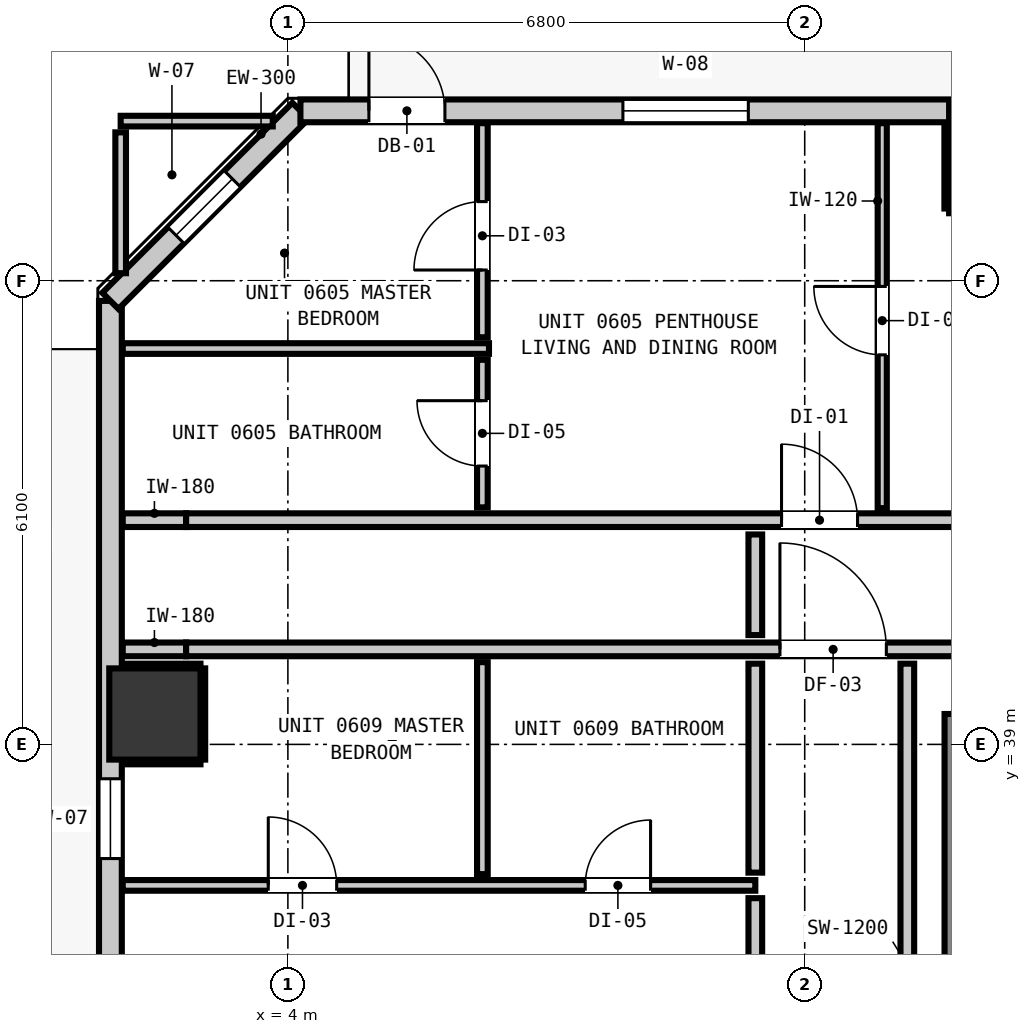
"""IFC4 building model, lengths in metres.
Left out: names, types, materials, properties, quantities, classifications, styles, units other than length and angle.
Written with IfcOpenShell. Run it as: python <this file> out.ifc"""

import sys

from ifc_helpers import new_model, si_unit, direction, frame, frame_2d, origin, origin_2d, place, context, subcontext, project, spatial, rectangle, extrude, element, fill, save


model = new_model("IFC4")
c1 = context("Model", 3, precision=1e-05, world=origin(), true_north=direction((0.0, 1.0)))
c2 = subcontext(c1, "Body", "Model", "MODEL_VIEW")
j1 = project(units=[si_unit("LENGTHUNIT", "METRE"), si_unit("PLANEANGLEUNIT", "RADIAN")], contexts=[c1])
p1 = place(None, origin())
s1 = spatial("IfcSite", under=j1, at=p1, CompositionType="ELEMENT")
p2 = place(p1, origin())
s2 = spatial("IfcBuilding", under=s1, at=p2, CompositionType="ELEMENT")
p3 = place(p2, frame((0.0, 0.0, 25.32)))
s3 = spatial("IfcBuildingStorey", under=s2, at=p3, CompositionType="ELEMENT", Elevation=25.32)
p4 = place(p3, frame((13.24, 31.205, 0.0), z_axis=(0.0, 0.0, 1.0), x_axis=(0.0, 1.0, 0.0)))
e1 = element("IfcWall", 1, at=p4, inside=s3, PredefinedType="SHEAR", context=c2, shape_type="SweptSolid", body=[
    extrude(rectangle(XDim=8.195, YDim=1.2, at=frame_2d((4.097, 0.0))), origin(), (0.0, 0.0, 1.0), 3.32),
])
p5 = place(p3, frame((13.4, 46.75, 0.0), z_axis=(0.0, 0.0, 1.0), x_axis=(1.0, 0.0, 0.0)))
e2 = element("IfcColumn", 2, at=p5, inside=s3, PredefinedType="COLUMN", context=c2, shape_type="SweptSolid", body=[
    extrude(rectangle(XDim=1.4, YDim=1.4, at=origin_2d()), origin(), (0.0, 0.0, 1.0), 3.32),
])
p6 = place(p3, frame((2.25, 39.4, 0.0), z_axis=(0.0, 0.0, 1.0), x_axis=(1.0, 0.0, 0.0)))
e3 = element("IfcColumn", 3, at=p6, inside=s3, PredefinedType="COLUMN", context=c2, shape_type="SweptSolid", body=[
    extrude(rectangle(XDim=1.2, YDim=1.2, at=origin_2d()), origin(), (0.0, 0.0, 1.0), 3.32),
])
p7 = place(p3, frame((1.665, 10.165, 0.0), z_axis=(0.0, 0.0, 1.0), x_axis=(0.0, 1.0, 0.0)))
e4 = element("IfcWall", 4, at=p7, inside=s3, PredefinedType="STANDARD", context=c2, shape_type="SweptSolid", body=[
    extrude(rectangle(XDim=34.67, YDim=0.3, at=frame_2d((17.335, 0.0))), origin(), (0.0, 0.0, 1.0), 3.06),
])
p8 = place(p7, frame((3.352, 0.0, 0.0)))
e5 = element("IfcOpeningElement", 5, at=p8, cuts=e4, PredefinedType="OPENING", context=c2, shape_type="SweptSolid", body=[
    extrude(rectangle(XDim=1.0, YDim=2.15, at=frame_2d((0.5, 1.075))), frame((0.0, 0.16, 0.0), z_axis=(0.0, -1.0, 0.0), x_axis=(1.0, 0.0, 0.0)), (0.0, 0.0, 1.0), 0.32),
])
p9 = place(p7, frame((14.448, 0.0, 0.85)))
e6 = element("IfcOpeningElement", 6, at=p9, cuts=e4, PredefinedType="OPENING", context=c2, shape_type="SweptSolid", body=[
    extrude(rectangle(XDim=1.65, YDim=1.75, at=frame_2d((0.825, 0.875))), frame((0.0, 0.16, 0.0), z_axis=(0.0, -1.0, 0.0), x_axis=(1.0, 0.0, 0.0)), (0.0, 0.0, 1.0), 0.32),
])
p10 = place(p7, frame((17.598, 0.0, 0.85)))
e7 = element("IfcOpeningElement", 7, at=p10, cuts=e4, PredefinedType="OPENING", context=c2, shape_type="SweptSolid", body=[
    extrude(rectangle(XDim=1.65, YDim=1.75, at=frame_2d((0.825, 0.875))), frame((0.0, 0.16, 0.0), z_axis=(0.0, -1.0, 0.0), x_axis=(1.0, 0.0, 0.0)), (0.0, 0.0, 1.0), 0.32),
])
p11 = place(p7, frame((23.982, 0.0, 0.85)))
e8 = element("IfcOpeningElement", 8, at=p11, cuts=e4, PredefinedType="OPENING", context=c2, shape_type="SweptSolid", body=[
    extrude(rectangle(XDim=1.65, YDim=1.75, at=frame_2d((0.825, 0.875))), frame((0.0, 0.16, 0.0), z_axis=(0.0, -1.0, 0.0), x_axis=(1.0, 0.0, 0.0)), (0.0, 0.0, 1.0), 0.32),
])
p12 = place(p7, frame((27.333, 0.0, 0.85)))
e9 = element("IfcOpeningElement", 9, at=p12, cuts=e4, PredefinedType="OPENING", context=c2, shape_type="SweptSolid", body=[
    extrude(rectangle(XDim=1.05, YDim=1.65, at=frame_2d((0.525, 0.825))), frame((0.0, 0.16, 0.0), z_axis=(0.0, -1.0, 0.0), x_axis=(1.0, 0.0, 0.0)), (0.0, 0.0, 1.0), 0.32),
])
p13 = place(p3, frame((1.665, 44.835, 0.0), z_axis=(0.0, 0.0, 1.0), x_axis=(0.707106781187, 0.707106781187, 0.0)))
e10 = element("IfcWall", 10, at=p13, inside=s3, PredefinedType="STANDARD", context=c2, shape_type="SweptSolid", body=[
    extrude(rectangle(XDim=3.536, YDim=0.3, at=frame_2d((1.768, 0.0))), origin(), (0.0, 0.0, 1.0), 3.06),
])
p14 = place(p13, frame((1.22, 0.0, 0.85)))
e11 = element("IfcOpeningElement", 11, at=p14, cuts=e10, PredefinedType="OPENING", context=c2, shape_type="SweptSolid", body=[
    extrude(rectangle(XDim=1.05, YDim=1.65, at=frame_2d((0.525, 0.825))), frame((0.0, 0.16, 0.0), z_axis=(0.0, -1.0, 0.0), x_axis=(1.0, 0.0, 0.0)), (0.0, 0.0, 1.0), 0.32),
])
p15 = place(p3, frame((4.165, 47.335, 0.0), z_axis=(0.0, 0.0, 1.0), x_axis=(1.0, 0.0, 0.0)))
e12 = element("IfcWall", 12, at=p15, inside=s3, PredefinedType="STANDARD", context=c2, shape_type="SweptSolid", body=[
    extrude(rectangle(XDim=37.47, YDim=0.3, at=frame_2d((18.735, 0.0))), origin(), (0.0, 0.0, 1.0), 3.06),
])
p16 = place(p15, frame((0.901, 0.0, 0.0)))
e13 = element("IfcOpeningElement", 13, at=p16, cuts=e12, PredefinedType="OPENING", context=c2, shape_type="SweptSolid", body=[
    extrude(rectangle(XDim=1.0, YDim=2.15, at=frame_2d((0.5, 1.075))), frame((0.0, 0.16, 0.0), z_axis=(0.0, -1.0, 0.0), x_axis=(1.0, 0.0, 0.0)), (0.0, 0.0, 1.0), 0.32),
])
p17 = place(p15, frame((4.243, 0.0, 0.85)))
e14 = element("IfcOpeningElement", 14, at=p17, cuts=e12, PredefinedType="OPENING", context=c2, shape_type="SweptSolid", body=[
    extrude(rectangle(XDim=1.65, YDim=1.75, at=frame_2d((0.825, 0.875))), frame((0.0, 0.16, 0.0), z_axis=(0.0, -1.0, 0.0), x_axis=(1.0, 0.0, 0.0)), (0.0, 0.0, 1.0), 0.32),
])
p18 = place(p15, frame((13.079, 0.0, 0.85)))
e15 = element("IfcOpeningElement", 15, at=p18, cuts=e12, PredefinedType="OPENING", context=c2, shape_type="SweptSolid", body=[
    extrude(rectangle(XDim=1.65, YDim=1.75, at=frame_2d((0.825, 0.875))), frame((0.0, 0.16, 0.0), z_axis=(0.0, -1.0, 0.0), x_axis=(1.0, 0.0, 0.0)), (0.0, 0.0, 1.0), 0.32),
])
p19 = place(p15, frame((29.274, 0.0, 0.85)))
e16 = element("IfcOpeningElement", 16, at=p19, cuts=e12, PredefinedType="OPENING", context=c2, shape_type="SweptSolid", body=[
    extrude(rectangle(XDim=1.65, YDim=1.75, at=frame_2d((0.825, 0.875))), frame((0.0, 0.16, 0.0), z_axis=(0.0, -1.0, 0.0), x_axis=(1.0, 0.0, 0.0)), (0.0, 0.0, 1.0), 0.32),
])
p20 = place(p15, frame((26.224, 0.0, 0.85)))
e17 = element("IfcOpeningElement", 17, at=p20, cuts=e12, PredefinedType="OPENING", context=c2, shape_type="SweptSolid", body=[
    extrude(rectangle(XDim=1.65, YDim=1.75, at=frame_2d((0.825, 0.875))), frame((0.0, 0.16, 0.0), z_axis=(0.0, -1.0, 0.0), x_axis=(1.0, 0.0, 0.0)), (0.0, 0.0, 1.0), 0.32),
])
p21 = place(p3, frame((1.827, 40.25, 0.0), z_axis=(0.0, 0.0, 1.0), x_axis=(1.0, 0.0, 0.0)))
e18 = element("IfcWall", 18, at=p21, inside=s3, PredefinedType="PARTITIONING", context=c2, shape_type="SweptSolid", body=[
    extrude(rectangle(XDim=0.834, YDim=0.18, at=frame_2d((0.417, 0.0))), origin(), (0.0, 0.0, 1.0), 3.06),
])
p22 = place(p3, frame((2.661, 40.25, 0.0), z_axis=(0.0, 0.0, 1.0), x_axis=(1.0, 0.0, 0.0)))
e19 = element("IfcWall", 19, at=p22, inside=s3, PredefinedType="PARTITIONING", context=c2, shape_type="SweptSolid", body=[
    extrude(rectangle(XDim=10.328, YDim=0.18, at=frame_2d((5.164, 0.0))), origin(), (0.0, 0.0, 1.0), 2.445),
])
p23 = place(p22, frame((7.813, 0.0, 0.0)))
e20 = element("IfcOpeningElement", 20, at=p23, cuts=e19, PredefinedType="OPENING", context=c2, shape_type="SweptSolid", body=[
    extrude(rectangle(XDim=1.4, YDim=2.15, at=frame_2d((0.7, 1.075))), frame((0.0, 0.1, 0.0), z_axis=(0.0, -1.0, 0.0), x_axis=(1.0, 0.0, 0.0)), (0.0, 0.0, 1.0), 0.2),
])
p24 = place(p3, frame((1.827, 41.95, 0.0), z_axis=(0.0, 0.0, 1.0), x_axis=(1.0, 0.0, 0.0)))
e21 = element("IfcWall", 21, at=p24, inside=s3, PredefinedType="PARTITIONING", context=c2, shape_type="SweptSolid", body=[
    extrude(rectangle(XDim=0.834, YDim=0.18, at=frame_2d((0.417, 0.0))), origin(), (0.0, 0.0, 1.0), 3.06),
])
p25 = place(p3, frame((2.661, 41.95, 0.0), z_axis=(0.0, 0.0, 1.0), x_axis=(1.0, 0.0, 0.0)))
e22 = element("IfcWall", 22, at=p25, inside=s3, PredefinedType="PARTITIONING", context=c2, shape_type="SweptSolid", body=[
    extrude(rectangle(XDim=10.328, YDim=0.18, at=frame_2d((5.164, 0.0))), origin(), (0.0, 0.0, 1.0), 2.445),
])
p26 = place(p25, frame((7.834, 0.0, 0.0)))
e23 = element("IfcOpeningElement", 23, at=p26, cuts=e22, PredefinedType="OPENING", context=c2, shape_type="SweptSolid", body=[
    extrude(rectangle(XDim=1.0, YDim=2.15, at=frame_2d((0.5, 1.075))), frame((0.0, 0.1, 0.0), z_axis=(0.0, -1.0, 0.0), x_axis=(1.0, 0.0, 0.0)), (0.0, 0.0, 1.0), 0.2),
])
p27 = place(p3, frame((1.827, 37.145, 0.0), z_axis=(0.0, 0.0, 1.0), x_axis=(1.0, 0.0, 0.0)))
e24 = element("IfcWall", 24, at=p27, inside=s3, PredefinedType="PARTITIONING", context=c2, shape_type="SweptSolid", body=[
    extrude(rectangle(XDim=8.323, YDim=0.14, at=frame_2d((4.162, 0.0))), origin(), (0.0, 0.0, 1.0), 3.06),
])
p28 = place(p27, frame((6.085, 0.0, 0.0)))
e25 = element("IfcOpeningElement", 25, at=p28, cuts=e24, PredefinedType="OPENING", context=c2, shape_type="SweptSolid", body=[
    extrude(rectangle(XDim=0.86, YDim=2.02, at=frame_2d((0.43, 1.01))), frame((0.0, 0.08, 0.0), z_axis=(0.0, -1.0, 0.0), x_axis=(1.0, 0.0, 0.0)), (0.0, 0.0, 1.0), 0.16),
])
p29 = place(p27, frame((1.915, 0.0, 0.0)))
e26 = element("IfcOpeningElement", 26, at=p29, cuts=e24, PredefinedType="OPENING", context=c2, shape_type="SweptSolid", body=[
    extrude(rectangle(XDim=0.9, YDim=2.1, at=frame_2d((0.45, 1.05))), frame((0.0, 0.08, 0.0), z_axis=(0.0, -1.0, 0.0), x_axis=(1.0, 0.0, 0.0)), (0.0, 0.0, 1.0), 0.16),
])
p30 = place(p3, frame((1.827, 44.208, 0.0), z_axis=(0.0, 0.0, 1.0), x_axis=(1.0, 0.0, 0.0)))
e27 = element("IfcWall", 27, at=p30, inside=s3, PredefinedType="PARTITIONING", context=c2, shape_type="SweptSolid", body=[
    extrude(rectangle(XDim=4.819, YDim=0.14, at=frame_2d((2.41, 0.0))), origin(), (0.0, 0.0, 1.0), 3.06),
])
p31 = place(p3, frame((1.8, 47.2, 0.0), z_axis=(0.0, 0.0, 1.0), x_axis=(1.0, 0.0, 0.0)))
e28 = element("IfcWall", 28, at=p31, inside=s3, PredefinedType="PARTITIONING", context=c2, shape_type="SweptSolid", body=[
    extrude(rectangle(XDim=2.001, YDim=0.14, at=frame_2d((1.0, 0.0))), origin(), (0.0, 0.0, 1.0), 3.06),
])
p32 = place(p3, frame((10.15, 33.118, 0.0), z_axis=(0.0, 0.0, 1.0), x_axis=(0.0, 1.0, 0.0)))
e29 = element("IfcWall", 29, at=p32, inside=s3, PredefinedType="PARTITIONING", context=c2, shape_type="SweptSolid", body=[
    extrude(rectangle(XDim=3.859, YDim=0.18, at=frame_2d((1.93, 0.0))), origin(), (0.0, 0.0, 1.0), 3.06),
])
p33 = place(p32, frame((1.353, 0.0, 0.0)))
e30 = element("IfcOpeningElement", 30, at=p33, cuts=e29, PredefinedType="OPENING", context=c2, shape_type="SweptSolid", body=[
    extrude(rectangle(XDim=1.0, YDim=2.15, at=frame_2d((0.5, 1.075))), frame((0.0, 0.1, 0.0), z_axis=(0.0, -1.0, 0.0), x_axis=(1.0, 0.0, 0.0)), (0.0, 0.0, 1.0), 0.2),
])
p34 = place(p3, frame((10.15, 37.313, 0.0), z_axis=(0.0, 0.0, 1.0), x_axis=(0.0, 1.0, 0.0)))
e31 = element("IfcWall", 31, at=p34, inside=s3, PredefinedType="PARTITIONING", context=c2, shape_type="SweptSolid", body=[
    extrude(rectangle(XDim=2.749, YDim=0.18, at=frame_2d((1.375, 0.0))), origin(), (0.0, 0.0, 1.0), 3.06),
])
p35 = place(p3, frame((10.15, 40.438, 0.0), z_axis=(0.0, 0.0, 1.0), x_axis=(0.0, 1.0, 0.0)))
e32 = element("IfcWall", 32, at=p35, inside=s3, PredefinedType="PARTITIONING", context=c2, shape_type="SweptSolid", body=[
    extrude(rectangle(XDim=1.324, YDim=0.18, at=frame_2d((0.662, 0.0))), origin(), (0.0, 0.0, 1.0), 3.06),
])
p36 = place(p3, frame((12.15, 21.368, 0.0), z_axis=(0.0, 0.0, 1.0), x_axis=(0.0, 1.0, 0.0)))
e33 = element("IfcWall", 33, at=p36, inside=s3, PredefinedType="PARTITIONING", context=c2, shape_type="SweptSolid", body=[
    extrude(rectangle(XDim=18.694, YDim=0.18, at=frame_2d((9.347, 0.0))), origin(), (0.0, 0.0, 1.0), 3.06),
])
p37 = place(p3, frame((1.8, 45.199, 0.0), z_axis=(0.0, 0.0, 1.0), x_axis=(0.0, 1.0, 0.0)))
e34 = element("IfcWall", 34, at=p37, inside=s3, PredefinedType="PARTITIONING", context=c2, shape_type="SweptSolid", body=[
    extrude(rectangle(XDim=1.853, YDim=0.14, at=frame_2d((0.927, 0.0))), origin(), (0.0, 0.0, 1.0), 3.06),
])
p38 = place(p3, frame((6.559, 37.293, 0.0), z_axis=(0.0, 0.0, 1.0), x_axis=(0.0, 1.0, 0.0)))
e35 = element("IfcWall", 35, at=p38, inside=s3, PredefinedType="PARTITIONING", context=c2, shape_type="SweptSolid", body=[
    extrude(rectangle(XDim=2.789, YDim=0.14, at=frame_2d((1.395, 0.0))), origin(), (0.0, 0.0, 1.0), 3.06),
])
p39 = place(p3, frame((6.559, 42.118, 0.0), z_axis=(0.0, 0.0, 1.0), x_axis=(0.0, 1.0, 0.0)))
e36 = element("IfcWall", 36, at=p39, inside=s3, PredefinedType="PARTITIONING", context=c2, shape_type="SweptSolid", body=[
    extrude(rectangle(XDim=1.942, YDim=0.14, at=frame_2d((0.971, 0.0))), origin(), (0.0, 0.0, 1.0), 3.06),
])
p40 = place(p39, frame((0.544, 0.0, 0.0)))
e37 = element("IfcOpeningElement", 37, at=p40, cuts=e36, PredefinedType="OPENING", context=c2, shape_type="SweptSolid", body=[
    extrude(rectangle(XDim=0.86, YDim=2.02, at=frame_2d((0.43, 1.01))), frame((0.0, 0.08, 0.0), z_axis=(0.0, -1.0, 0.0), x_axis=(1.0, 0.0, 0.0)), (0.0, 0.0, 1.0), 0.16),
])
p41 = place(p3, frame((6.559, 44.356, 0.0), z_axis=(0.0, 0.0, 1.0), x_axis=(0.0, 1.0, 0.0)))
e38 = element("IfcWall", 38, at=p41, inside=s3, PredefinedType="PARTITIONING", context=c2, shape_type="SweptSolid", body=[
    extrude(rectangle(XDim=2.817, YDim=0.14, at=frame_2d((1.409, 0.0))), origin(), (0.0, 0.0, 1.0), 3.06),
])
p42 = place(p41, frame((0.885, 0.0, 0.0)))
e39 = element("IfcOpeningElement", 39, at=p42, cuts=e38, PredefinedType="OPENING", context=c2, shape_type="SweptSolid", body=[
    extrude(rectangle(XDim=0.9, YDim=2.1, at=frame_2d((0.45, 1.05))), frame((0.0, 0.08, 0.0), z_axis=(0.0, -1.0, 0.0), x_axis=(1.0, 0.0, 0.0)), (0.0, 0.0, 1.0), 0.16),
])
p43 = place(p3, frame((11.82, 42.108, 0.0), z_axis=(0.0, 0.0, 1.0), x_axis=(0.0, 1.0, 0.0)))
e40 = element("IfcWall", 40, at=p43, inside=s3, PredefinedType="PARTITIONING", context=c2, shape_type="SweptSolid", body=[
    extrude(rectangle(XDim=5.065, YDim=0.12, at=frame_2d((2.533, 0.0))), origin(), (0.0, 0.0, 1.0), 3.06),
])
p44 = place(p43, frame((2.017, 0.0, 0.0)))
e41 = element("IfcOpeningElement", 41, at=p44, cuts=e40, PredefinedType="OPENING", context=c2, shape_type="SweptSolid", body=[
    extrude(rectangle(XDim=0.9, YDim=2.1, at=frame_2d((0.45, 1.05))), frame((0.0, 0.07, 0.0), z_axis=(0.0, -1.0, 0.0), x_axis=(1.0, 0.0, 0.0)), (0.0, 0.0, 1.0), 0.14),
])
p45 = place(p3, frame((12.7, 46.018, 0.0), z_axis=(0.0, 0.0, 1.0), x_axis=(1.0, 0.0, 0.0)))
e42 = element("IfcWall", 42, at=p45, inside=s3, PredefinedType="PARTITIONING", context=c2, shape_type="SweptSolid", body=[
    extrude(rectangle(XDim=1.4, YDim=0.06, at=frame_2d((0.7, 0.0))), origin(), (0.0, 0.0, 1.0), 1.45),
])
p46 = place(p3, frame((12.668, 46.05, 0.0), z_axis=(0.0, 0.0, 1.0), x_axis=(0.0, 1.0, 0.0)))
e43 = element("IfcWall", 43, at=p46, inside=s3, PredefinedType="PARTITIONING", context=c2, shape_type="SweptSolid", body=[
    extrude(rectangle(XDim=1.12, YDim=0.06, at=frame_2d((0.56, 0.0))), origin(), (0.0, 0.0, 1.0), 1.45),
])
for number, where, z_axis, x_axis in (
    (44, (1.83, 38.768, 0.0), (0.0, 0.0, 1.0), (1.0, 0.0, 0.0)),
    (45, (1.83, 40.032, 0.0), (0.0, 0.0, 1.0), (1.0, 0.0, 0.0)),
):
    element("IfcWall", number, at=place(p3, frame(where, z_axis=z_axis, x_axis=x_axis)), inside=s3, PredefinedType="PARTITIONING", context=c2, shape_type="SweptSolid", body=[
        extrude(rectangle(XDim=1.02, YDim=0.06, at=frame_2d((0.51, 0.0))), origin(), (0.0, 0.0, 1.0), 1.45),
    ])
p47 = place(p3, frame((2.882, 38.8, 0.0), z_axis=(0.0, 0.0, 1.0), x_axis=(0.0, 1.0, 0.0)))
e46 = element("IfcWall", 46, at=p47, inside=s3, PredefinedType="PARTITIONING", context=c2, shape_type="SweptSolid", body=[
    extrude(rectangle(XDim=1.2, YDim=0.06, at=frame_2d((0.6, 0.0))), origin(), (0.0, 0.0, 1.0), 1.45),
])
p48 = place(p16, origin())
e47 = element("IfcDoor", 47, at=p48, inside=s3, OperationType="SINGLE_SWING_LEFT", PredefinedType="DOOR", context=c2, shape_type="SweptSolid", body=[
    extrude(rectangle(XDim=1.0, YDim=2.15, at=frame_2d((0.5, 1.075))), frame((0.0, 0.025, 0.0), z_axis=(0.0, -1.0, 0.0), x_axis=(1.0, 0.0, 0.0)), (0.0, 0.0, 1.0), 0.05),
])
fill(e13, e47)
p49 = place(p12, origin())
e48 = element("IfcWindow", 48, at=p49, inside=s3, PartitioningType="SINGLE_PANEL", PredefinedType="WINDOW", context=c2, shape_type="SweptSolid", body=[
    extrude(rectangle(XDim=1.05, YDim=1.65, at=frame_2d((0.525, 0.825))), frame((0.0, 0.03, 0.0), z_axis=(0.0, -1.0, 0.0), x_axis=(1.0, 0.0, 0.0)), (0.0, 0.0, 1.0), 0.06),
])
fill(e9, e48)
p50 = place(p17, origin())
e49 = element("IfcWindow", 49, at=p50, inside=s3, PartitioningType="SINGLE_PANEL", PredefinedType="WINDOW", context=c2, shape_type="SweptSolid", body=[
    extrude(rectangle(XDim=1.65, YDim=1.75, at=frame_2d((0.825, 0.875))), frame((0.0, 0.03, 0.0), z_axis=(0.0, -1.0, 0.0), x_axis=(1.0, 0.0, 0.0)), (0.0, 0.0, 1.0), 0.06),
])
fill(e14, e49)
p51 = place(p14, origin())
e50 = element("IfcWindow", 50, at=p51, inside=s3, PartitioningType="SINGLE_PANEL", PredefinedType="WINDOW", context=c2, shape_type="SweptSolid", body=[
    extrude(rectangle(XDim=1.05, YDim=1.65, at=frame_2d((0.525, 0.825))), frame((0.0, 0.03, 0.0), z_axis=(0.0, -1.0, 0.0), x_axis=(1.0, 0.0, 0.0)), (0.0, 0.0, 1.0), 0.06),
])
fill(e11, e50)
p52 = place(p23, origin())
e51 = element("IfcDoor", 51, at=p52, inside=s3, OperationType="SINGLE_SWING_LEFT", PredefinedType="DOOR", context=c2, shape_type="SweptSolid", body=[
    extrude(rectangle(XDim=1.4, YDim=2.15, at=frame_2d((0.7, 1.075))), frame((0.0, 0.025, 0.0), z_axis=(0.0, -1.0, 0.0), x_axis=(1.0, 0.0, 0.0)), (0.0, 0.0, 1.0), 0.05),
])
fill(e20, e51)
p53 = place(p26, origin())
e52 = element("IfcDoor", 52, at=p53, inside=s3, OperationType="SINGLE_SWING_LEFT", PredefinedType="DOOR", context=c2, shape_type="SweptSolid", body=[
    extrude(rectangle(XDim=1.0, YDim=2.15, at=frame_2d((0.5, 1.075))), frame((0.0, 0.025, 0.0), z_axis=(0.0, -1.0, 0.0), x_axis=(1.0, 0.0, 0.0)), (0.0, 0.0, 1.0), 0.05),
])
fill(e23, e52)
p54 = place(p40, origin())
e53 = element("IfcDoor", 53, at=p54, inside=s3, OperationType="SINGLE_SWING_RIGHT", PredefinedType="DOOR", context=c2, shape_type="SweptSolid", body=[
    extrude(rectangle(XDim=0.86, YDim=2.02, at=frame_2d((0.43, 1.01))), frame((0.0, 0.025, 0.0), z_axis=(0.0, -1.0, 0.0), x_axis=(1.0, 0.0, 0.0)), (0.0, 0.0, 1.0), 0.05),
])
fill(e37, e53)
p55 = place(p42, origin())
e54 = element("IfcDoor", 54, at=p55, inside=s3, OperationType="SINGLE_SWING_LEFT", PredefinedType="DOOR", context=c2, shape_type="SweptSolid", body=[
    extrude(rectangle(XDim=0.9, YDim=2.1, at=frame_2d((0.45, 1.05))), frame((0.0, 0.025, 0.0), z_axis=(0.0, -1.0, 0.0), x_axis=(1.0, 0.0, 0.0)), (0.0, 0.0, 1.0), 0.05),
])
fill(e39, e54)
p56 = place(p44, origin())
e55 = element("IfcDoor", 55, at=p56, inside=s3, OperationType="SINGLE_SWING_RIGHT", PredefinedType="DOOR", context=c2, shape_type="SweptSolid", body=[
    extrude(rectangle(XDim=0.9, YDim=2.1, at=frame_2d((0.45, 1.05))), frame((0.0, 0.025, 0.0), z_axis=(0.0, -1.0, 0.0), x_axis=(1.0, 0.0, 0.0)), (0.0, 0.0, 1.0), 0.05),
])
fill(e41, e55)
p57 = place(p28, origin())
e56 = element("IfcDoor", 56, at=p57, inside=s3, OperationType="SINGLE_SWING_RIGHT", PredefinedType="DOOR", context=c2, shape_type="SweptSolid", body=[
    extrude(rectangle(XDim=0.86, YDim=2.02, at=frame_2d((0.43, 1.01))), frame((0.0, 0.025, 0.0), z_axis=(0.0, -1.0, 0.0), x_axis=(1.0, 0.0, 0.0)), (0.0, 0.0, 1.0), 0.05),
])
fill(e25, e56)
p58 = place(p29, origin())
e57 = element("IfcDoor", 57, at=p58, inside=s3, OperationType="SINGLE_SWING_LEFT", PredefinedType="DOOR", context=c2, shape_type="SweptSolid", body=[
    extrude(rectangle(XDim=0.9, YDim=2.1, at=frame_2d((0.45, 1.05))), frame((0.0, 0.025, 0.0), z_axis=(0.0, -1.0, 0.0), x_axis=(1.0, 0.0, 0.0)), (0.0, 0.0, 1.0), 0.05),
])
fill(e26, e57)
save(model, sys.argv[1])
